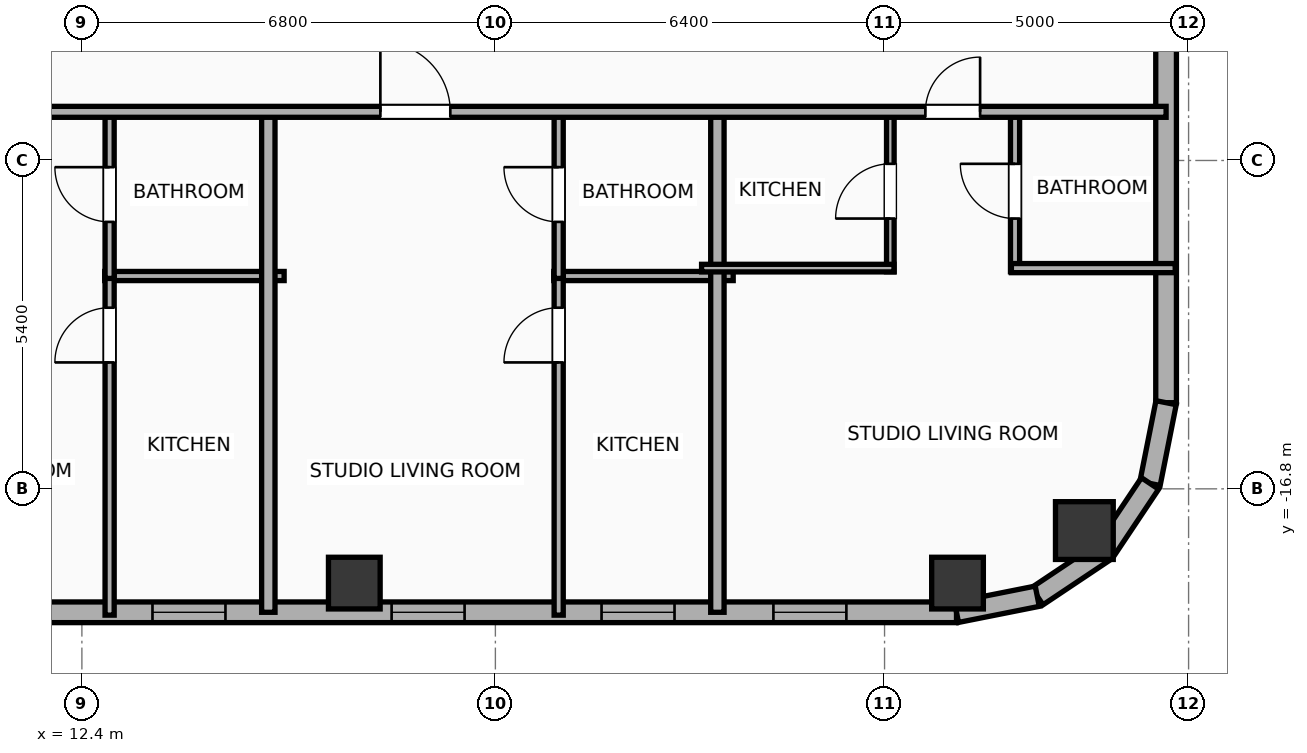
"""IFC4 building model, lengths in metres.
Left out: names, types, materials, properties, quantities, classifications, styles, units other than length and angle.
Written with IfcOpenShell. Run it as: python <this file> out.ifc"""

import sys

from ifc_helpers import new_model, si_unit, direction, frame, frame_2d, origin, origin_2d, place, context, subcontext, project, spatial, rectangle, hollow_rectangle, hollow_circle, extrude, element, fill, save


model = new_model("IFC4")
c1 = context("Model", 3, precision=1e-05, world=origin(), true_north=direction((0.0, 1.0)))
c2 = subcontext(c1, "Body", "Model", "MODEL_VIEW")
j1 = project(units=[si_unit("LENGTHUNIT", "METRE"), si_unit("PLANEANGLEUNIT", "RADIAN")], contexts=[c1])
p1 = place(None, origin())
s1 = spatial("IfcSite", under=j1, at=p1, CompositionType="ELEMENT")
p2 = place(p1, origin())
s2 = spatial("IfcBuilding", under=s1, at=p2, CompositionType="ELEMENT")
p3 = place(p2, frame((0.0, 0.0, 247.0)))
s3 = spatial("IfcBuildingStorey", under=s2, at=p3, CompositionType="ELEMENT", Elevation=247.0)
for number, where, z_axis, x_axis in (
    (1, (16.88, -18.35, 0.0), (0.0, 0.0, 1.0), (1.0, 0.0, 0.0)),
    (2, (26.8, -18.35, 0.0), (0.0, 0.0, 1.0), (1.0, 0.0, 0.0)),
):
    element("IfcColumn", number, at=place(p3, frame(where, z_axis=z_axis, x_axis=x_axis)), inside=s3, PredefinedType="COLUMN", context=c2, shape_type="SweptSolid", body=[
        extrude(hollow_rectangle(XDim=0.85, YDim=0.85, WallThickness=0.028, at=origin_2d()), origin(), (0.0, 0.0, 1.0), 3.9),
    ])
p4 = place(p3, frame((28.886, -17.486, 0.0), z_axis=(0.0, 0.0, 1.0), x_axis=(1.0, 0.0, 0.0)))
e3 = element("IfcColumn", 3, at=p4, inside=s3, PredefinedType="COLUMN", context=c2, shape_type="SweptSolid", body=[
    extrude(hollow_circle(Radius=0.475, WallThickness=0.032, at=origin_2d()), origin(), (0.0, 0.0, 1.0), 3.9),
])
p5 = place(p3, frame((26.783, -18.83, 0.0), z_axis=(0.0, 0.0, 1.0), x_axis=(-1.0, 0.0, 0.0)))
e4 = element("IfcWall", 4, at=p5, inside=s3, PredefinedType="ELEMENTEDWALL", context=c2, shape_type="SweptSolid", body=[
    extrude(rectangle(XDim=49.566, YDim=0.34, at=frame_2d((24.783, 0.0))), origin(), (0.0, 0.0, 1.0), 3.65),
])
p6 = place(p5, frame((23.583, 0.0, 0.75)))
e5 = element("IfcOpeningElement", 5, at=p6, cuts=e4, PredefinedType="OPENING", context=c2, shape_type="SweptSolid", body=[
    extrude(rectangle(XDim=2.4, YDim=2.1, at=frame_2d((1.2, 1.05))), frame((0.0, 0.18, 0.0), z_axis=(0.0, -1.0, 0.0), x_axis=(1.0, 0.0, 0.0)), (0.0, 0.0, 1.0), 0.36),
])
p7 = place(p5, frame((41.756, 0.0, 0.75)))
e6 = element("IfcOpeningElement", 6, at=p7, cuts=e4, PredefinedType="OPENING", context=c2, shape_type="SweptSolid", body=[
    extrude(rectangle(XDim=2.4, YDim=2.1, at=frame_2d((1.2, 1.05))), frame((0.0, 0.18, 0.0), z_axis=(0.0, -1.0, 0.0), x_axis=(1.0, 0.0, 0.0)), (0.0, 0.0, 1.0), 0.36),
])
p8 = place(p5, frame((47.222, 0.0, 0.75)))
e7 = element("IfcOpeningElement", 7, at=p8, cuts=e4, PredefinedType="OPENING", context=c2, shape_type="SweptSolid", body=[
    extrude(rectangle(XDim=1.2, YDim=2.05, at=frame_2d((0.6, 1.025))), frame((0.0, 0.18, 0.0), z_axis=(0.0, -1.0, 0.0), x_axis=(1.0, 0.0, 0.0)), (0.0, 0.0, 1.0), 0.36),
])
p9 = place(p5, frame((45.131, 0.0, 0.75)))
e8 = element("IfcOpeningElement", 8, at=p9, cuts=e4, PredefinedType="OPENING", context=c2, shape_type="SweptSolid", body=[
    extrude(rectangle(XDim=1.2, YDim=2.05, at=frame_2d((0.6, 1.025))), frame((0.0, 0.18, 0.0), z_axis=(0.0, -1.0, 0.0), x_axis=(1.0, 0.0, 0.0)), (0.0, 0.0, 1.0), 0.36),
])
p10 = place(p5, frame((37.289, 0.0, 0.75)))
e9 = element("IfcOpeningElement", 9, at=p10, cuts=e4, PredefinedType="OPENING", context=c2, shape_type="SweptSolid", body=[
    extrude(rectangle(XDim=1.2, YDim=2.05, at=frame_2d((0.6, 1.025))), frame((0.0, 0.18, 0.0), z_axis=(0.0, -1.0, 0.0), x_axis=(1.0, 0.0, 0.0)), (0.0, 0.0, 1.0), 0.36),
])
p11 = place(p5, frame((15.715, 0.0, 0.75)))
e10 = element("IfcOpeningElement", 10, at=p11, cuts=e4, PredefinedType="OPENING", context=c2, shape_type="SweptSolid", body=[
    extrude(rectangle(XDim=1.2, YDim=2.05, at=frame_2d((0.6, 1.025))), frame((0.0, 0.18, 0.0), z_axis=(0.0, -1.0, 0.0), x_axis=(1.0, 0.0, 0.0)), (0.0, 0.0, 1.0), 0.36),
])
p12 = place(p5, frame((12.022, 0.0, 0.75)))
e11 = element("IfcOpeningElement", 11, at=p12, cuts=e4, PredefinedType="OPENING", context=c2, shape_type="SweptSolid", body=[
    extrude(rectangle(XDim=1.2, YDim=2.05, at=frame_2d((0.6, 1.025))), frame((0.0, 0.18, 0.0), z_axis=(0.0, -1.0, 0.0), x_axis=(1.0, 0.0, 0.0)), (0.0, 0.0, 1.0), 0.36),
])
p13 = place(p5, frame((8.09, 0.0, 0.75)))
e12 = element("IfcOpeningElement", 12, at=p13, cuts=e4, PredefinedType="OPENING", context=c2, shape_type="SweptSolid", body=[
    extrude(rectangle(XDim=1.2, YDim=2.05, at=frame_2d((0.6, 1.025))), frame((0.0, 0.18, 0.0), z_axis=(0.0, -1.0, 0.0), x_axis=(1.0, 0.0, 0.0)), (0.0, 0.0, 1.0), 0.36),
])
p14 = place(p5, frame((4.637, 0.0, 0.75)))
e13 = element("IfcOpeningElement", 13, at=p14, cuts=e4, PredefinedType="OPENING", context=c2, shape_type="SweptSolid", body=[
    extrude(rectangle(XDim=1.2, YDim=2.05, at=frame_2d((0.6, 1.025))), frame((0.0, 0.18, 0.0), z_axis=(0.0, -1.0, 0.0), x_axis=(1.0, 0.0, 0.0)), (0.0, 0.0, 1.0), 0.36),
])
p15 = place(p5, frame((1.811, 0.0, 0.75)))
e14 = element("IfcOpeningElement", 14, at=p15, cuts=e4, PredefinedType="OPENING", context=c2, shape_type="SweptSolid", body=[
    extrude(rectangle(XDim=1.2, YDim=2.05, at=frame_2d((0.6, 1.025))), frame((0.0, 0.18, 0.0), z_axis=(0.0, -1.0, 0.0), x_axis=(1.0, 0.0, 0.0)), (0.0, 0.0, 1.0), 0.36),
])
p16 = place(p5, frame((32.253, 0.0, 0.75)))
e15 = element("IfcOpeningElement", 15, at=p16, cuts=e4, PredefinedType="OPENING", context=c2, shape_type="SweptSolid", body=[
    extrude(rectangle(XDim=1.2, YDim=2.05, at=frame_2d((0.6, 1.025))), frame((0.0, 0.18, 0.0), z_axis=(0.0, -1.0, 0.0), x_axis=(1.0, 0.0, 0.0)), (0.0, 0.0, 1.0), 0.36),
])
p17 = place(p5, frame((27.853, 0.0, 0.75)))
e16 = element("IfcOpeningElement", 16, at=p17, cuts=e4, PredefinedType="OPENING", context=c2, shape_type="SweptSolid", body=[
    extrude(rectangle(XDim=1.2, YDim=2.05, at=frame_2d((0.6, 1.025))), frame((0.0, 0.18, 0.0), z_axis=(0.0, -1.0, 0.0), x_axis=(1.0, 0.0, 0.0)), (0.0, 0.0, 1.0), 0.36),
])
p18 = place(p5, frame((20.473, 0.0, 0.75)))
e17 = element("IfcOpeningElement", 17, at=p18, cuts=e4, PredefinedType="OPENING", context=c2, shape_type="SweptSolid", body=[
    extrude(rectangle(XDim=1.2, YDim=2.05, at=frame_2d((0.6, 1.025))), frame((0.0, 0.18, 0.0), z_axis=(0.0, -1.0, 0.0), x_axis=(1.0, 0.0, 0.0)), (0.0, 0.0, 1.0), 0.36),
])
p19 = place(p3, frame((30.23, 16.583, 0.0), z_axis=(0.0, 0.0, 1.0), x_axis=(0.0, -1.0, 0.0)))
e18 = element("IfcWall", 18, at=p19, inside=s3, PredefinedType="ELEMENTEDWALL", context=c2, shape_type="SweptSolid", body=[
    extrude(rectangle(XDim=31.967, YDim=0.34, at=frame_2d((15.983, 0.0))), origin(), (0.0, 0.0, 1.0), 3.65),
])
p20 = place(p19, frame((11.388, 0.0, 0.75)))
e19 = element("IfcOpeningElement", 19, at=p20, cuts=e18, PredefinedType="OPENING", context=c2, shape_type="SweptSolid", body=[
    extrude(rectangle(XDim=1.2, YDim=2.05, at=frame_2d((0.6, 1.025))), frame((0.0, 0.18, 0.0), z_axis=(0.0, -1.0, 0.0), x_axis=(1.0, 0.0, 0.0)), (0.0, 0.0, 1.0), 0.36),
])
p21 = place(p19, frame((20.438, 0.0, 0.75)))
e20 = element("IfcOpeningElement", 20, at=p21, cuts=e18, PredefinedType="OPENING", context=c2, shape_type="SweptSolid", body=[
    extrude(rectangle(XDim=1.2, YDim=2.05, at=frame_2d((0.6, 1.025))), frame((0.0, 0.18, 0.0), z_axis=(0.0, -1.0, 0.0), x_axis=(1.0, 0.0, 0.0)), (0.0, 0.0, 1.0), 0.36),
])
p22 = place(p3, frame((30.23, -15.383, 0.0), z_axis=(0.0, 0.0, 1.0), x_axis=(-0.195110379894, -0.98078129043, 0.0)))
e21 = element("IfcWall", 21, at=p22, inside=s3, PredefinedType="ELEMENTEDWALL", context=c2, shape_type="SweptSolid", body=[
    extrude(rectangle(XDim=1.354, YDim=0.34, at=frame_2d((0.677, 0.0))), origin(), (0.0, 0.0, 1.0), 3.65),
])
p23 = place(p3, frame((29.966, -16.711, 0.0), z_axis=(0.0, 0.0, 1.0), x_axis=(-0.555584683399, -0.831459956686, 0.0)))
e22 = element("IfcWall", 22, at=p23, inside=s3, PredefinedType="ELEMENTEDWALL", context=c2, shape_type="SweptSolid", body=[
    extrude(rectangle(XDim=1.337, YDim=0.34, at=frame_2d((0.668, 0.0))), origin(), (0.0, 0.0, 1.0), 3.65),
])
p24 = place(p3, frame((29.223, -17.823, 0.0), z_axis=(0.0, 0.0, 1.0), x_axis=(-0.831403586725, -0.555669034571, 0.0)))
e23 = element("IfcWall", 23, at=p24, inside=s3, PredefinedType="ELEMENTEDWALL", context=c2, shape_type="SweptSolid", body=[
    extrude(rectangle(XDim=1.337, YDim=0.34, at=frame_2d((0.668, 0.0))), origin(), (0.0, 0.0, 1.0), 3.65),
])
p25 = place(p3, frame((28.111, -18.566, 0.0), z_axis=(0.0, 0.0, 1.0), x_axis=(-0.980788153188, -0.195075878998, 0.0)))
e24 = element("IfcWall", 24, at=p25, inside=s3, PredefinedType="ELEMENTEDWALL", context=c2, shape_type="SweptSolid", body=[
    extrude(rectangle(XDim=1.354, YDim=0.34, at=frame_2d((0.677, 0.0))), origin(), (0.0, 0.0, 1.0), 3.65),
])
p26 = place(p3, frame((12.776, -13.3, 0.0), z_axis=(0.0, 0.0, 1.0), x_axis=(1.0, 0.0, 0.0)))
e25 = element("IfcWall", 25, at=p26, inside=s3, PredefinedType="PLUMBINGWALL", context=c2, shape_type="SweptSolid", body=[
    extrude(rectangle(XDim=2.95, YDim=0.15, at=frame_2d((1.475, 0.0))), origin(), (0.0, 0.0, 1.0), 3.65),
])
p27 = place(p3, frame((12.856, -18.877, 0.0), z_axis=(0.0, 0.0, 1.0), x_axis=(0.0, 1.0, 0.0)))
e26 = element("IfcWall", 26, at=p27, inside=s3, PredefinedType="PLUMBINGWALL", context=c2, shape_type="SweptSolid", body=[
    extrude(rectangle(XDim=5.617, YDim=0.15, at=frame_2d((2.808, 0.0))), origin(), (0.0, 0.0, 1.0), 3.65),
])
p28 = place(p27, frame((4.156, 0.0, 0.0)))
e27 = element("IfcOpeningElement", 27, at=p28, cuts=e26, PredefinedType="OPENING", context=c2, shape_type="SweptSolid", body=[
    extrude(rectangle(XDim=0.9, YDim=2.05, at=frame_2d((0.45, 1.025))), frame((0.0, 0.085, 0.0), z_axis=(0.0, -1.0, 0.0), x_axis=(1.0, 0.0, 0.0)), (0.0, 0.0, 1.0), 0.17),
])
p29 = place(p3, frame((12.856, -13.34, 0.0), z_axis=(0.0, 0.0, 1.0), x_axis=(0.0, 1.0, 0.0)))
e28 = element("IfcWall", 28, at=p29, inside=s3, PredefinedType="PLUMBINGWALL", context=c2, shape_type="SweptSolid", body=[
    extrude(rectangle(XDim=2.76, YDim=0.15, at=frame_2d((1.38, 0.0))), origin(), (0.0, 0.0, 1.0), 3.65),
])
p30 = place(p29, frame((0.93, 0.0, 0.0)))
e29 = element("IfcOpeningElement", 29, at=p30, cuts=e28, PredefinedType="OPENING", context=c2, shape_type="SweptSolid", body=[
    extrude(rectangle(XDim=0.9, YDim=2.05, at=frame_2d((0.45, 1.025))), frame((0.0, 0.085, 0.0), z_axis=(0.0, -1.0, 0.0), x_axis=(1.0, 0.0, 0.0)), (0.0, 0.0, 1.0), 0.17),
])
p31 = place(p3, frame((15.466, -18.83, 0.0), z_axis=(0.0, 0.0, 1.0), x_axis=(0.0, 1.0, 0.0)))
e30 = element("IfcWall", 30, at=p31, inside=s3, PredefinedType="PARTITIONING", context=c2, shape_type="SweptSolid", body=[
    extrude(rectangle(XDim=8.31, YDim=0.22, at=frame_2d((4.155, 0.0))), origin(), (0.0, 0.0, 1.0), 3.65),
])
p32 = place(p3, frame((20.161, -13.3, 0.0), z_axis=(0.0, 0.0, 1.0), x_axis=(1.0, 0.0, 0.0)))
e31 = element("IfcWall", 31, at=p32, inside=s3, PredefinedType="PLUMBINGWALL", context=c2, shape_type="SweptSolid", body=[
    extrude(rectangle(XDim=2.95, YDim=0.15, at=frame_2d((1.475, 0.0))), origin(), (0.0, 0.0, 1.0), 3.65),
])
p33 = place(p3, frame((20.241, -18.877, 0.0), z_axis=(0.0, 0.0, 1.0), x_axis=(0.0, 1.0, 0.0)))
e32 = element("IfcWall", 32, at=p33, inside=s3, PredefinedType="PLUMBINGWALL", context=c2, shape_type="SweptSolid", body=[
    extrude(rectangle(XDim=5.617, YDim=0.15, at=frame_2d((2.808, 0.0))), origin(), (0.0, 0.0, 1.0), 3.65),
])
p34 = place(p33, frame((4.156, 0.0, 0.0)))
e33 = element("IfcOpeningElement", 33, at=p34, cuts=e32, PredefinedType="OPENING", context=c2, shape_type="SweptSolid", body=[
    extrude(rectangle(XDim=0.9, YDim=2.05, at=frame_2d((0.45, 1.025))), frame((0.0, 0.085, 0.0), z_axis=(0.0, -1.0, 0.0), x_axis=(1.0, 0.0, 0.0)), (0.0, 0.0, 1.0), 0.17),
])
p35 = place(p3, frame((20.241, -13.34, 0.0), z_axis=(0.0, 0.0, 1.0), x_axis=(0.0, 1.0, 0.0)))
e34 = element("IfcWall", 34, at=p35, inside=s3, PredefinedType="PLUMBINGWALL", context=c2, shape_type="SweptSolid", body=[
    extrude(rectangle(XDim=2.76, YDim=0.15, at=frame_2d((1.38, 0.0))), origin(), (0.0, 0.0, 1.0), 3.65),
])
p36 = place(p35, frame((0.93, 0.0, 0.0)))
e35 = element("IfcOpeningElement", 35, at=p36, cuts=e34, PredefinedType="OPENING", context=c2, shape_type="SweptSolid", body=[
    extrude(rectangle(XDim=0.9, YDim=2.05, at=frame_2d((0.45, 1.025))), frame((0.0, 0.085, 0.0), z_axis=(0.0, -1.0, 0.0), x_axis=(1.0, 0.0, 0.0)), (0.0, 0.0, 1.0), 0.17),
])
p37 = place(p3, frame((22.851, -18.83, 0.0), z_axis=(0.0, 0.0, 1.0), x_axis=(0.0, 1.0, 0.0)))
e36 = element("IfcWall", 36, at=p37, inside=s3, PredefinedType="PARTITIONING", context=c2, shape_type="SweptSolid", body=[
    extrude(rectangle(XDim=8.31, YDim=0.22, at=frame_2d((4.155, 0.0))), origin(), (0.0, 0.0, 1.0), 3.65),
])
p38 = place(p3, frame((25.695, -13.23, 0.0), z_axis=(0.0, 0.0, 1.0), x_axis=(0.0, 1.0, 0.0)))
e37 = element("IfcWall", 37, at=p38, inside=s3, PredefinedType="PARTITIONING", context=c2, shape_type="SweptSolid", body=[
    extrude(rectangle(XDim=2.65, YDim=0.125, at=frame_2d((1.325, 0.0))), origin(), (0.0, 0.0, 1.0), 3.65),
])
p39 = place(p38, frame((0.875, 0.0, 0.0)))
e38 = element("IfcOpeningElement", 38, at=p39, cuts=e37, PredefinedType="OPENING", context=c2, shape_type="SweptSolid", body=[
    extrude(rectangle(XDim=0.9, YDim=2.05, at=frame_2d((0.45, 1.025))), frame((0.0, 0.073, 0.0), z_axis=(0.0, -1.0, 0.0), x_axis=(1.0, 0.0, 0.0)), (0.0, 0.0, 1.0), 0.145),
])
p40 = place(p3, frame((27.746, -13.23, 0.0), z_axis=(0.0, 0.0, 1.0), x_axis=(0.0, 1.0, 0.0)))
e39 = element("IfcWall", 39, at=p40, inside=s3, PredefinedType="PLUMBINGWALL", context=c2, shape_type="SweptSolid", body=[
    extrude(rectangle(XDim=2.65, YDim=0.15, at=frame_2d((1.325, 0.0))), origin(), (0.0, 0.0, 1.0), 3.65),
])
p41 = place(p40, frame((0.875, 0.0, 0.0)))
e40 = element("IfcOpeningElement", 40, at=p41, cuts=e39, PredefinedType="OPENING", context=c2, shape_type="SweptSolid", body=[
    extrude(rectangle(XDim=0.9, YDim=2.05, at=frame_2d((0.45, 1.025))), frame((0.0, 0.085, 0.0), z_axis=(0.0, -1.0, 0.0), x_axis=(1.0, 0.0, 0.0)), (0.0, 0.0, 1.0), 0.17),
])
p42 = place(p3, frame((22.591, -13.17, 0.0), z_axis=(0.0, 0.0, 1.0), x_axis=(1.0, 0.0, 0.0)))
e41 = element("IfcWall", 41, at=p42, inside=s3, PredefinedType="PARTITIONING", context=c2, shape_type="SweptSolid", body=[
    extrude(rectangle(XDim=3.164, YDim=0.125, at=frame_2d((1.582, 0.0))), origin(), (0.0, 0.0, 1.0), 3.65),
])
p43 = place(p3, frame((27.686, -13.17, 0.0), z_axis=(0.0, 0.0, 1.0), x_axis=(1.0, 0.0, 0.0)))
e42 = element("IfcWall", 42, at=p43, inside=s3, PredefinedType="PLUMBINGWALL", context=c2, shape_type="SweptSolid", body=[
    extrude(rectangle(XDim=2.694, YDim=0.15, at=frame_2d((1.347, 0.0))), origin(), (0.0, 0.0, 1.0), 3.65),
])
p44 = place(p3, frame((8.08, -10.6, 0.0), z_axis=(0.0, 0.0, 1.0), x_axis=(1.0, 0.0, 0.0)))
e43 = element("IfcWall", 43, at=p44, inside=s3, PredefinedType="PARTITIONING", context=c2, shape_type="SweptSolid", body=[
    extrude(rectangle(XDim=22.15, YDim=0.18, at=frame_2d((11.075, 0.0))), origin(), (0.0, 0.0, 1.0), 3.65),
])
p45 = place(p44, frame((1.844, 0.0, 0.0)))
e44 = element("IfcOpeningElement", 44, at=p45, cuts=e43, PredefinedType="OPENING", context=c2, shape_type="SweptSolid", body=[
    extrude(rectangle(XDim=1.15, YDim=2.05, at=frame_2d((0.575, 1.025))), frame((0.0, 0.1, 0.0), z_axis=(0.0, -1.0, 0.0), x_axis=(1.0, 0.0, 0.0)), (0.0, 0.0, 1.0), 0.2),
])
p46 = place(p44, frame((9.229, 0.0, 0.0)))
e45 = element("IfcOpeningElement", 45, at=p46, cuts=e43, PredefinedType="OPENING", context=c2, shape_type="SweptSolid", body=[
    extrude(rectangle(XDim=1.15, YDim=2.05, at=frame_2d((0.575, 1.025))), frame((0.0, 0.1, 0.0), z_axis=(0.0, -1.0, 0.0), x_axis=(1.0, 0.0, 0.0)), (0.0, 0.0, 1.0), 0.2),
])
p47 = place(p44, frame((18.191, 0.0, 0.0)))
e46 = element("IfcOpeningElement", 46, at=p47, cuts=e43, PredefinedType="OPENING", context=c2, shape_type="SweptSolid", body=[
    extrude(rectangle(XDim=0.9, YDim=2.05, at=frame_2d((0.45, 1.025))), frame((0.0, 0.1, 0.0), z_axis=(0.0, -1.0, 0.0), x_axis=(1.0, 0.0, 0.0)), (0.0, 0.0, 1.0), 0.2),
])
p48 = place(p12, origin())
e47 = element("IfcWindow", 47, at=p48, inside=s3, PartitioningType="SINGLE_PANEL", PredefinedType="WINDOW", context=c2, shape_type="SweptSolid", body=[
    extrude(rectangle(XDim=1.2, YDim=2.05, at=frame_2d((0.6, 1.025))), frame((0.0, 0.03, 0.0), z_axis=(0.0, -1.0, 0.0), x_axis=(1.0, 0.0, 0.0)), (0.0, 0.0, 1.0), 0.06),
])
fill(e11, e47)
p49 = place(p13, origin())
e48 = element("IfcWindow", 48, at=p49, inside=s3, PartitioningType="SINGLE_PANEL", PredefinedType="WINDOW", context=c2, shape_type="SweptSolid", body=[
    extrude(rectangle(XDim=1.2, YDim=2.05, at=frame_2d((0.6, 1.025))), frame((0.0, 0.03, 0.0), z_axis=(0.0, -1.0, 0.0), x_axis=(1.0, 0.0, 0.0)), (0.0, 0.0, 1.0), 0.06),
])
fill(e12, e48)
p50 = place(p14, origin())
e49 = element("IfcWindow", 49, at=p50, inside=s3, PartitioningType="SINGLE_PANEL", PredefinedType="WINDOW", context=c2, shape_type="SweptSolid", body=[
    extrude(rectangle(XDim=1.2, YDim=2.05, at=frame_2d((0.6, 1.025))), frame((0.0, 0.03, 0.0), z_axis=(0.0, -1.0, 0.0), x_axis=(1.0, 0.0, 0.0)), (0.0, 0.0, 1.0), 0.06),
])
fill(e13, e49)
p51 = place(p15, origin())
e50 = element("IfcWindow", 50, at=p51, inside=s3, PartitioningType="SINGLE_PANEL", PredefinedType="WINDOW", context=c2, shape_type="SweptSolid", body=[
    extrude(rectangle(XDim=1.2, YDim=2.05, at=frame_2d((0.6, 1.025))), frame((0.0, 0.03, 0.0), z_axis=(0.0, -1.0, 0.0), x_axis=(1.0, 0.0, 0.0)), (0.0, 0.0, 1.0), 0.06),
])
fill(e14, e50)
p52 = place(p28, origin())
e51 = element("IfcDoor", 51, at=p52, inside=s3, OperationType="SINGLE_SWING_LEFT", PredefinedType="DOOR", context=c2, shape_type="SweptSolid", body=[
    extrude(rectangle(XDim=0.9, YDim=2.05, at=frame_2d((0.45, 1.025))), frame((0.0, 0.025, 0.0), z_axis=(0.0, -1.0, 0.0), x_axis=(1.0, 0.0, 0.0)), (0.0, 0.0, 1.0), 0.05),
])
fill(e27, e51)
p53 = place(p30, origin())
e52 = element("IfcDoor", 52, at=p53, inside=s3, OperationType="SINGLE_SWING_RIGHT", PredefinedType="DOOR", context=c2, shape_type="SweptSolid", body=[
    extrude(rectangle(XDim=0.9, YDim=2.05, at=frame_2d((0.45, 1.025))), frame((0.0, 0.025, 0.0), z_axis=(0.0, -1.0, 0.0), x_axis=(1.0, 0.0, 0.0)), (0.0, 0.0, 1.0), 0.05),
])
fill(e29, e52)
p54 = place(p34, origin())
e53 = element("IfcDoor", 53, at=p54, inside=s3, OperationType="SINGLE_SWING_LEFT", PredefinedType="DOOR", context=c2, shape_type="SweptSolid", body=[
    extrude(rectangle(XDim=0.9, YDim=2.05, at=frame_2d((0.45, 1.025))), frame((0.0, 0.025, 0.0), z_axis=(0.0, -1.0, 0.0), x_axis=(1.0, 0.0, 0.0)), (0.0, 0.0, 1.0), 0.05),
])
fill(e33, e53)
p55 = place(p36, origin())
e54 = element("IfcDoor", 54, at=p55, inside=s3, OperationType="SINGLE_SWING_RIGHT", PredefinedType="DOOR", context=c2, shape_type="SweptSolid", body=[
    extrude(rectangle(XDim=0.9, YDim=2.05, at=frame_2d((0.45, 1.025))), frame((0.0, 0.025, 0.0), z_axis=(0.0, -1.0, 0.0), x_axis=(1.0, 0.0, 0.0)), (0.0, 0.0, 1.0), 0.05),
])
fill(e35, e54)
p56 = place(p39, origin())
e55 = element("IfcDoor", 55, at=p56, inside=s3, OperationType="SINGLE_SWING_LEFT", PredefinedType="DOOR", context=c2, shape_type="SweptSolid", body=[
    extrude(rectangle(XDim=0.9, YDim=2.05, at=frame_2d((0.45, 1.025))), frame((0.0, 0.025, 0.0), z_axis=(0.0, -1.0, 0.0), x_axis=(1.0, 0.0, 0.0)), (0.0, 0.0, 1.0), 0.05),
])
fill(e38, e55)
p57 = place(p41, origin())
e56 = element("IfcDoor", 56, at=p57, inside=s3, OperationType="SINGLE_SWING_RIGHT", PredefinedType="DOOR", context=c2, shape_type="SweptSolid", body=[
    extrude(rectangle(XDim=0.9, YDim=2.05, at=frame_2d((0.45, 1.025))), frame((0.0, 0.025, 0.0), z_axis=(0.0, -1.0, 0.0), x_axis=(1.0, 0.0, 0.0)), (0.0, 0.0, 1.0), 0.05),
])
fill(e40, e56)
p58 = place(p46, origin())
e57 = element("IfcDoor", 57, at=p58, inside=s3, OperationType="SINGLE_SWING_LEFT", PredefinedType="DOOR", context=c2, shape_type="SweptSolid", body=[
    extrude(rectangle(XDim=1.15, YDim=2.05, at=frame_2d((0.575, 1.025))), frame((0.0, 0.025, 0.0), z_axis=(0.0, -1.0, 0.0), x_axis=(1.0, 0.0, 0.0)), (0.0, 0.0, 1.0), 0.05),
])
fill(e45, e57)
p59 = place(p47, origin())
e58 = element("IfcDoor", 58, at=p59, inside=s3, OperationType="SINGLE_SWING_RIGHT", PredefinedType="DOOR", context=c2, shape_type="SweptSolid", body=[
    extrude(rectangle(XDim=0.9, YDim=2.05, at=frame_2d((0.45, 1.025))), frame((0.0, 0.025, 0.0), z_axis=(0.0, -1.0, 0.0), x_axis=(1.0, 0.0, 0.0)), (0.0, 0.0, 1.0), 0.05),
])
fill(e46, e58)
save(model, sys.argv[1])
